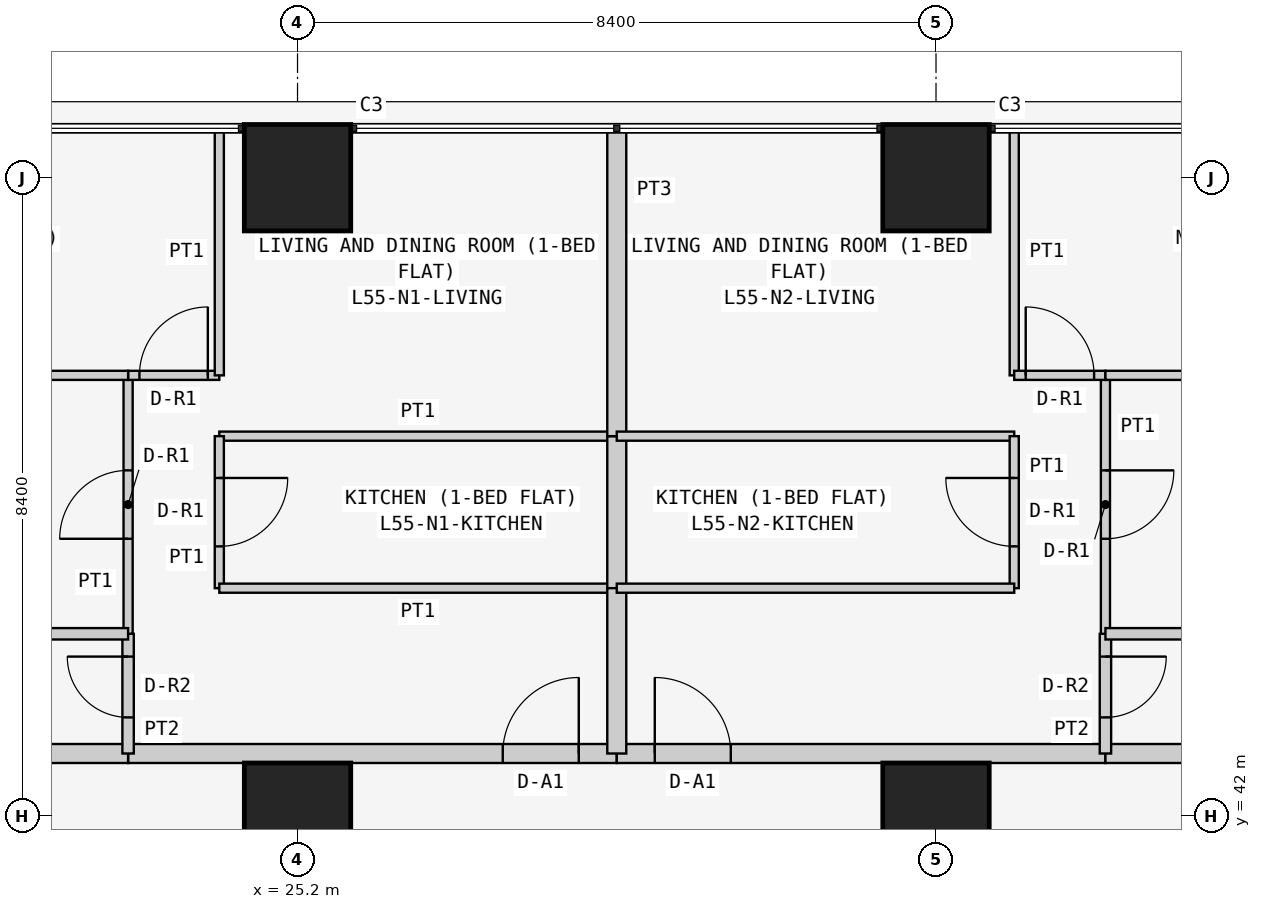
"""IFC4 building model, lengths in metres.
Left out: names, types, materials, properties, quantities, classifications, styles, units other than length and angle.
Written with IfcOpenShell. Run it as: python <this file> out.ifc"""

import sys

from ifc_helpers import new_model, si_unit, direction, frame, frame_2d, origin, origin_2d, place, context, subcontext, project, spatial, rectangle, extrude, element, fill, save


model = new_model("IFC4")
c1 = context("Model", 3, precision=1e-05, world=origin(), true_north=direction((0.0, 1.0)))
c2 = subcontext(c1, "Body", "Model", "MODEL_VIEW")
j1 = project(units=[si_unit("LENGTHUNIT", "METRE"), si_unit("PLANEANGLEUNIT", "RADIAN")], contexts=[c1])
p1 = place(None, origin())
s1 = spatial("IfcSite", under=j1, at=p1, CompositionType="ELEMENT")
p2 = place(p1, origin())
s2 = spatial("IfcBuilding", under=s1, at=p2, CompositionType="ELEMENT")
p3 = place(p2, frame((0.0, 0.0, 212.1)))
s3 = spatial("IfcBuildingStorey", under=s2, at=p3, CompositionType="ELEMENT", Elevation=212.1)
for number, where, z_axis, x_axis in (
    (1, (25.2, 42.0, 0.0), (0.0, 0.0, 1.0), (1.0, 0.0, 0.0)),
    (2, (25.2, 50.4, 0.0), (0.0, 0.0, 1.0), (1.0, 0.0, 0.0)),
    (3, (33.6, 42.0, 0.0), (0.0, 0.0, 1.0), (1.0, 0.0, 0.0)),
    (4, (33.6, 50.4, 0.0), (0.0, 0.0, 1.0), (1.0, 0.0, 0.0)),
):
    element("IfcColumn", number, at=place(p3, frame(where, z_axis=z_axis, x_axis=x_axis)), inside=s3, PredefinedType="COLUMN", context=c2, shape_type="SweptSolid", body=[
        extrude(rectangle(XDim=1.4, YDim=1.4, at=origin_2d()), origin(), (0.0, 0.0, 1.0), 3.6),
    ])
p4 = place(p3, frame((22.971, 42.825, 0.0), z_axis=(0.0, 0.0, 1.0), x_axis=(1.0, 0.0, 0.0)))
e5 = element("IfcWall", 5, at=p4, inside=s3, PredefinedType="PARTITIONING", context=c2, shape_type="SweptSolid", body=[
    extrude(rectangle(XDim=6.429, YDim=0.25, at=frame_2d((3.214, 0.0))), origin(), (0.0, 0.0, 1.0), 3.45),
])
p5 = place(p4, frame((4.929, 0.0, 0.0)))
e6 = element("IfcOpeningElement", 6, at=p5, cuts=e5, PredefinedType="OPENING", context=c2, shape_type="SweptSolid", body=[
    extrude(rectangle(XDim=1.0, YDim=2.1, at=frame_2d((0.5, 1.05))), frame((0.0, 0.135, 0.0), z_axis=(0.0, -1.0, 0.0), x_axis=(1.0, 0.0, 0.0)), (0.0, 0.0, 1.0), 0.27),
])
p6 = place(p3, frame((16.1, 42.825, 0.0), z_axis=(0.0, 0.0, 1.0), x_axis=(1.0, 0.0, 0.0)))
e7 = element("IfcWall", 7, at=p6, inside=s3, PredefinedType="PARTITIONING", context=c2, shape_type="SweptSolid", body=[
    extrude(rectangle(XDim=6.871, YDim=0.25, at=frame_2d((3.436, 0.0))), origin(), (0.0, 0.0, 1.0), 3.45),
])
p7 = place(p3, frame((29.4, 42.825, 0.0), z_axis=(0.0, 0.0, 1.0), x_axis=(1.0, 0.0, 0.0)))
e8 = element("IfcWall", 8, at=p7, inside=s3, PredefinedType="PARTITIONING", context=c2, shape_type="SweptSolid", body=[
    extrude(rectangle(XDim=6.429, YDim=0.25, at=frame_2d((3.215, 0.0))), origin(), (0.0, 0.0, 1.0), 3.45),
])
p8 = place(p7, frame((0.5, 0.0, 0.0)))
e9 = element("IfcOpeningElement", 9, at=p8, cuts=e8, PredefinedType="OPENING", context=c2, shape_type="SweptSolid", body=[
    extrude(rectangle(XDim=1.0, YDim=2.1, at=frame_2d((0.5, 1.05))), frame((0.0, 0.135, 0.0), z_axis=(0.0, -1.0, 0.0), x_axis=(1.0, 0.0, 0.0)), (0.0, 0.0, 1.0), 0.27),
])
p9 = place(p3, frame((35.829, 42.825, 0.0), z_axis=(0.0, 0.0, 1.0), x_axis=(1.0, 0.0, 0.0)))
e10 = element("IfcWall", 10, at=p9, inside=s3, PredefinedType="PARTITIONING", context=c2, shape_type="SweptSolid", body=[
    extrude(rectangle(XDim=6.871, YDim=0.25, at=frame_2d((3.436, 0.0))), origin(), (0.0, 0.0, 1.0), 3.45),
])
p10 = place(p3, frame((29.4, 47.0, 0.0), z_axis=(0.0, 0.0, 1.0), x_axis=(-1.0, 0.0, 0.0)))
e11 = element("IfcWall", 11, at=p10, inside=s3, PredefinedType="PARTITIONING", context=c2, shape_type="SweptSolid", body=[
    extrude(rectangle(XDim=5.229, YDim=0.12, at=frame_2d((2.615, 0.0))), origin(), (0.0, 0.0, 1.0), 3.45),
])
p11 = place(p3, frame((24.171, 47.0, 0.0), z_axis=(0.0, 0.0, 1.0), x_axis=(0.0, -1.0, 0.0)))
e12 = element("IfcWall", 12, at=p11, inside=s3, PredefinedType="PARTITIONING", context=c2, shape_type="SweptSolid", body=[
    extrude(rectangle(XDim=2.0, YDim=0.12, at=frame_2d((1.0, 0.0))), origin(), (0.0, 0.0, 1.0), 3.45),
])
p12 = place(p11, frame((0.55, 0.0, 0.0)))
e13 = element("IfcOpeningElement", 13, at=p12, cuts=e12, PredefinedType="OPENING", context=c2, shape_type="SweptSolid", body=[
    extrude(rectangle(XDim=0.9, YDim=2.1, at=frame_2d((0.45, 1.05))), frame((0.0, 0.07, 0.0), z_axis=(0.0, -1.0, 0.0), x_axis=(1.0, 0.0, 0.0)), (0.0, 0.0, 1.0), 0.14),
])
p13 = place(p3, frame((24.171, 45.0, 0.0), z_axis=(0.0, 0.0, 1.0), x_axis=(1.0, 0.0, 0.0)))
e14 = element("IfcWall", 14, at=p13, inside=s3, PredefinedType="PARTITIONING", context=c2, shape_type="SweptSolid", body=[
    extrude(rectangle(XDim=5.229, YDim=0.12, at=frame_2d((2.615, 0.0))), origin(), (0.0, 0.0, 1.0), 3.45),
])
p14 = place(p3, frame((29.4, 45.0, 0.0), z_axis=(0.0, 0.0, 1.0), x_axis=(0.0, 1.0, 0.0)))
e15 = element("IfcWall", 15, at=p14, inside=s3, PredefinedType="PARTITIONING", context=c2, shape_type="SweptSolid", body=[
    extrude(rectangle(XDim=2.0, YDim=0.25, at=frame_2d((1.0, 0.0))), origin(), (0.0, 0.0, 1.0), 2.848),
])
p15 = place(p3, frame((22.971, 42.825, 0.0), z_axis=(0.0, 0.0, 1.0), x_axis=(0.0, 1.0, 0.0)))
e16 = element("IfcWall", 16, at=p15, inside=s3, PredefinedType="PARTITIONING", context=c2, shape_type="SweptSolid", body=[
    extrude(rectangle(XDim=1.575, YDim=0.15, at=frame_2d((0.788, 0.0))), origin(), (0.0, 0.0, 1.0), 3.45),
])
p16 = place(p15, frame((0.475, 0.0, 0.0)))
e17 = element("IfcOpeningElement", 17, at=p16, cuts=e16, PredefinedType="OPENING", context=c2, shape_type="SweptSolid", body=[
    extrude(rectangle(XDim=0.8, YDim=2.1, at=frame_2d((0.4, 1.05))), frame((0.0, 0.085, 0.0), z_axis=(0.0, -1.0, 0.0), x_axis=(1.0, 0.0, 0.0)), (0.0, 0.0, 1.0), 0.17),
])
p17 = place(p3, frame((22.971, 44.4, 0.0), z_axis=(0.0, 0.0, 1.0), x_axis=(0.0, 1.0, 0.0)))
e18 = element("IfcWall", 18, at=p17, inside=s3, PredefinedType="PARTITIONING", context=c2, shape_type="SweptSolid", body=[
    extrude(rectangle(XDim=3.4, YDim=0.12, at=frame_2d((1.7, 0.0))), origin(), (0.0, 0.0, 1.0), 3.45),
])
p18 = place(p17, frame((1.25, 0.0, 0.0)))
e19 = element("IfcOpeningElement", 19, at=p18, cuts=e18, PredefinedType="OPENING", context=c2, shape_type="SweptSolid", body=[
    extrude(rectangle(XDim=0.9, YDim=2.1, at=frame_2d((0.45, 1.05))), frame((0.0, 0.07, 0.0), z_axis=(0.0, -1.0, 0.0), x_axis=(1.0, 0.0, 0.0)), (0.0, 0.0, 1.0), 0.14),
])
p19 = place(p3, frame((22.971, 47.8, 0.0), z_axis=(0.0, 0.0, 1.0), x_axis=(1.0, 0.0, 0.0)))
e20 = element("IfcWall", 20, at=p19, inside=s3, PredefinedType="PARTITIONING", context=c2, shape_type="SweptSolid", body=[
    extrude(rectangle(XDim=1.2, YDim=0.12, at=frame_2d((0.6, 0.0))), origin(), (0.0, 0.0, 1.0), 3.45),
])
p20 = place(p19, frame((0.149, 0.0, 0.0)))
e21 = element("IfcOpeningElement", 21, at=p20, cuts=e20, PredefinedType="OPENING", context=c2, shape_type="SweptSolid", body=[
    extrude(rectangle(XDim=0.9, YDim=2.1, at=frame_2d((0.45, 1.05))), frame((0.0, 0.07, 0.0), z_axis=(0.0, -1.0, 0.0), x_axis=(1.0, 0.0, 0.0)), (0.0, 0.0, 1.0), 0.14),
])
p21 = place(p3, frame((24.171, 47.8, 0.0), z_axis=(0.0, 0.0, 1.0), x_axis=(0.0, 1.0, 0.0)))
e22 = element("IfcWall", 22, at=p21, inside=s3, PredefinedType="PARTITIONING", context=c2, shape_type="SweptSolid", body=[
    extrude(rectangle(XDim=3.25, YDim=0.12, at=frame_2d((1.625, 0.0))), origin(), (0.0, 0.0, 1.0), 3.45),
])
p22 = place(p3, frame((29.4, 45.0, 0.0), z_axis=(0.0, 0.0, 1.0), x_axis=(0.0, -1.0, 0.0)))
e23 = element("IfcWall", 23, at=p22, inside=s3, PredefinedType="PARTITIONING", context=c2, shape_type="SweptSolid", body=[
    extrude(rectangle(XDim=2.175, YDim=0.25, at=frame_2d((1.087, 0.0))), origin(), (0.0, 0.0, 1.0), 2.848),
])
p23 = place(p3, frame((29.4, 51.05, 0.0), z_axis=(0.0, 0.0, 1.0), x_axis=(0.0, -1.0, 0.0)))
e24 = element("IfcWall", 24, at=p23, inside=s3, PredefinedType="PARTITIONING", context=c2, shape_type="SweptSolid", body=[
    extrude(rectangle(XDim=4.05, YDim=0.25, at=frame_2d((2.025, 0.0))), origin(), (0.0, 0.0, 1.0), 2.848),
])
p24 = place(p3, frame((22.971, 44.4, 0.0), z_axis=(0.0, 0.0, 1.0), x_axis=(-1.0, 0.0, 0.0)))
e25 = element("IfcWall", 25, at=p24, inside=s3, PredefinedType="PARTITIONING", context=c2, shape_type="SweptSolid", body=[
    extrude(rectangle(XDim=6.871, YDim=0.15, at=frame_2d((3.436, 0.0))), origin(), (0.0, 0.0, 1.0), 3.45),
])
p25 = place(p3, frame((22.971, 47.8, 0.0), z_axis=(0.0, 0.0, 1.0), x_axis=(-1.0, 0.0, 0.0)))
e26 = element("IfcWall", 26, at=p25, inside=s3, PredefinedType="PARTITIONING", context=c2, shape_type="SweptSolid", body=[
    extrude(rectangle(XDim=6.871, YDim=0.12, at=frame_2d((3.436, 0.0))), origin(), (0.0, 0.0, 1.0), 3.45),
])
p26 = place(p3, frame((29.4, 47.0, 0.0), z_axis=(0.0, 0.0, 1.0), x_axis=(1.0, 0.0, 0.0)))
e27 = element("IfcWall", 27, at=p26, inside=s3, PredefinedType="PARTITIONING", context=c2, shape_type="SweptSolid", body=[
    extrude(rectangle(XDim=5.229, YDim=0.12, at=frame_2d((2.615, 0.0))), origin(), (0.0, 0.0, 1.0), 3.45),
])
p27 = place(p3, frame((34.629, 47.0, 0.0), z_axis=(0.0, 0.0, 1.0), x_axis=(0.0, -1.0, 0.0)))
e28 = element("IfcWall", 28, at=p27, inside=s3, PredefinedType="PARTITIONING", context=c2, shape_type="SweptSolid", body=[
    extrude(rectangle(XDim=2.0, YDim=0.12, at=frame_2d((1.0, 0.0))), origin(), (0.0, 0.0, 1.0), 3.45),
])
p28 = place(p27, frame((0.55, 0.0, 0.0)))
e29 = element("IfcOpeningElement", 29, at=p28, cuts=e28, PredefinedType="OPENING", context=c2, shape_type="SweptSolid", body=[
    extrude(rectangle(XDim=0.9, YDim=2.1, at=frame_2d((0.45, 1.05))), frame((0.0, 0.07, 0.0), z_axis=(0.0, -1.0, 0.0), x_axis=(1.0, 0.0, 0.0)), (0.0, 0.0, 1.0), 0.14),
])
p29 = place(p3, frame((34.629, 45.0, 0.0), z_axis=(0.0, 0.0, 1.0), x_axis=(-1.0, 0.0, 0.0)))
e30 = element("IfcWall", 30, at=p29, inside=s3, PredefinedType="PARTITIONING", context=c2, shape_type="SweptSolid", body=[
    extrude(rectangle(XDim=5.229, YDim=0.12, at=frame_2d((2.615, 0.0))), origin(), (0.0, 0.0, 1.0), 3.45),
])
p30 = place(p3, frame((35.829, 44.4, 0.0), z_axis=(0.0, 0.0, 1.0), x_axis=(0.0, -1.0, 0.0)))
e31 = element("IfcWall", 31, at=p30, inside=s3, PredefinedType="PARTITIONING", context=c2, shape_type="SweptSolid", body=[
    extrude(rectangle(XDim=1.575, YDim=0.15, at=frame_2d((0.788, 0.0))), origin(), (0.0, 0.0, 1.0), 3.45),
])
p31 = place(p30, frame((0.3, 0.0, 0.0)))
e32 = element("IfcOpeningElement", 32, at=p31, cuts=e31, PredefinedType="OPENING", context=c2, shape_type="SweptSolid", body=[
    extrude(rectangle(XDim=0.8, YDim=2.1, at=frame_2d((0.4, 1.05))), frame((0.0, 0.085, 0.0), z_axis=(0.0, -1.0, 0.0), x_axis=(1.0, 0.0, 0.0)), (0.0, 0.0, 1.0), 0.17),
])
p32 = place(p3, frame((35.829, 47.8, 0.0), z_axis=(0.0, 0.0, 1.0), x_axis=(0.0, -1.0, 0.0)))
e33 = element("IfcWall", 33, at=p32, inside=s3, PredefinedType="PARTITIONING", context=c2, shape_type="SweptSolid", body=[
    extrude(rectangle(XDim=3.4, YDim=0.12, at=frame_2d((1.7, 0.0))), origin(), (0.0, 0.0, 1.0), 3.45),
])
p33 = place(p32, frame((1.25, 0.0, 0.0)))
e34 = element("IfcOpeningElement", 34, at=p33, cuts=e33, PredefinedType="OPENING", context=c2, shape_type="SweptSolid", body=[
    extrude(rectangle(XDim=0.9, YDim=2.1, at=frame_2d((0.45, 1.05))), frame((0.0, 0.07, 0.0), z_axis=(0.0, -1.0, 0.0), x_axis=(1.0, 0.0, 0.0)), (0.0, 0.0, 1.0), 0.14),
])
p34 = place(p3, frame((34.629, 51.05, 0.0), z_axis=(0.0, 0.0, 1.0), x_axis=(0.0, -1.0, 0.0)))
e35 = element("IfcWall", 35, at=p34, inside=s3, PredefinedType="PARTITIONING", context=c2, shape_type="SweptSolid", body=[
    extrude(rectangle(XDim=3.25, YDim=0.12, at=frame_2d((1.625, 0.0))), origin(), (0.0, 0.0, 1.0), 3.45),
])
p35 = place(p3, frame((34.629, 47.8, 0.0), z_axis=(0.0, 0.0, 1.0), x_axis=(1.0, 0.0, 0.0)))
e36 = element("IfcWall", 36, at=p35, inside=s3, PredefinedType="PARTITIONING", context=c2, shape_type="SweptSolid", body=[
    extrude(rectangle(XDim=1.2, YDim=0.12, at=frame_2d((0.6, 0.0))), origin(), (0.0, 0.0, 1.0), 3.45),
])
p36 = place(p35, frame((0.151, 0.0, 0.0)))
e37 = element("IfcOpeningElement", 37, at=p36, cuts=e36, PredefinedType="OPENING", context=c2, shape_type="SweptSolid", body=[
    extrude(rectangle(XDim=0.9, YDim=2.1, at=frame_2d((0.45, 1.05))), frame((0.0, 0.07, 0.0), z_axis=(0.0, -1.0, 0.0), x_axis=(1.0, 0.0, 0.0)), (0.0, 0.0, 1.0), 0.14),
])
p37 = place(p3, frame((35.829, 44.4, 0.0), z_axis=(0.0, 0.0, 1.0), x_axis=(1.0, 0.0, 0.0)))
e38 = element("IfcWall", 38, at=p37, inside=s3, PredefinedType="PARTITIONING", context=c2, shape_type="SweptSolid", body=[
    extrude(rectangle(XDim=6.871, YDim=0.15, at=frame_2d((3.436, 0.0))), origin(), (0.0, 0.0, 1.0), 3.45),
])
p38 = place(p3, frame((35.829, 47.8, 0.0), z_axis=(0.0, 0.0, 1.0), x_axis=(1.0, 0.0, 0.0)))
e39 = element("IfcWall", 39, at=p38, inside=s3, PredefinedType="PARTITIONING", context=c2, shape_type="SweptSolid", body=[
    extrude(rectangle(XDim=6.871, YDim=0.12, at=frame_2d((3.436, 0.0))), origin(), (0.0, 0.0, 1.0), 3.45),
])
p39 = place(p5, origin())
e40 = element("IfcDoor", 40, at=p39, inside=s3, OperationType="SINGLE_SWING_RIGHT", PredefinedType="DOOR", context=c2, shape_type="SweptSolid", body=[
    extrude(rectangle(XDim=1.0, YDim=2.1, at=frame_2d((0.5, 1.05))), frame((0.0, 0.025, 0.0), z_axis=(0.0, -1.0, 0.0), x_axis=(1.0, 0.0, 0.0)), (0.0, 0.0, 1.0), 0.05),
])
fill(e6, e40)
p40 = place(p12, origin())
e41 = element("IfcDoor", 41, at=p40, inside=s3, OperationType="SINGLE_SWING_LEFT", PredefinedType="DOOR", context=c2, shape_type="SweptSolid", body=[
    extrude(rectangle(XDim=0.9, YDim=2.1, at=frame_2d((0.45, 1.05))), frame((0.0, 0.025, 0.0), z_axis=(0.0, -1.0, 0.0), x_axis=(1.0, 0.0, 0.0)), (0.0, 0.0, 1.0), 0.05),
])
fill(e13, e41)
p41 = place(p16, origin())
e42 = element("IfcDoor", 42, at=p41, inside=s3, OperationType="SINGLE_SWING_RIGHT", PredefinedType="DOOR", context=c2, shape_type="SweptSolid", body=[
    extrude(rectangle(XDim=0.8, YDim=2.1, at=frame_2d((0.4, 1.05))), frame((0.0, 0.025, 0.0), z_axis=(0.0, -1.0, 0.0), x_axis=(1.0, 0.0, 0.0)), (0.0, 0.0, 1.0), 0.05),
])
fill(e17, e42)
p42 = place(p18, origin())
e43 = element("IfcDoor", 43, at=p42, inside=s3, OperationType="SINGLE_SWING_LEFT", PredefinedType="DOOR", context=c2, shape_type="SweptSolid", body=[
    extrude(rectangle(XDim=0.9, YDim=2.1, at=frame_2d((0.45, 1.05))), frame((0.0, 0.025, 0.0), z_axis=(0.0, -1.0, 0.0), x_axis=(1.0, 0.0, 0.0)), (0.0, 0.0, 1.0), 0.05),
])
fill(e19, e43)
p43 = place(p20, origin())
e44 = element("IfcDoor", 44, at=p43, inside=s3, OperationType="SINGLE_SWING_RIGHT", PredefinedType="DOOR", context=c2, shape_type="SweptSolid", body=[
    extrude(rectangle(XDim=0.9, YDim=2.1, at=frame_2d((0.45, 1.05))), frame((0.0, 0.025, 0.0), z_axis=(0.0, -1.0, 0.0), x_axis=(1.0, 0.0, 0.0)), (0.0, 0.0, 1.0), 0.05),
])
fill(e21, e44)
p44 = place(p8, origin())
e45 = element("IfcDoor", 45, at=p44, inside=s3, OperationType="SINGLE_SWING_LEFT", PredefinedType="DOOR", context=c2, shape_type="SweptSolid", body=[
    extrude(rectangle(XDim=1.0, YDim=2.1, at=frame_2d((0.5, 1.05))), frame((0.0, 0.025, 0.0), z_axis=(0.0, -1.0, 0.0), x_axis=(1.0, 0.0, 0.0)), (0.0, 0.0, 1.0), 0.05),
])
fill(e9, e45)
p45 = place(p28, frame((0.9, 0.0, 0.0), z_axis=(0.0, 0.0, 1.0), x_axis=(-1.0, 0.0, 0.0)))
e46 = element("IfcDoor", 46, at=p45, inside=s3, OperationType="SINGLE_SWING_RIGHT", PredefinedType="DOOR", context=c2, shape_type="SweptSolid", body=[
    extrude(rectangle(XDim=0.9, YDim=2.1, at=frame_2d((0.45, 1.05))), frame((0.0, 0.025, 0.0), z_axis=(0.0, -1.0, 0.0), x_axis=(1.0, 0.0, 0.0)), (0.0, 0.0, 1.0), 0.05),
])
fill(e29, e46)
p46 = place(p31, origin())
e47 = element("IfcDoor", 47, at=p46, inside=s3, OperationType="SINGLE_SWING_LEFT", PredefinedType="DOOR", context=c2, shape_type="SweptSolid", body=[
    extrude(rectangle(XDim=0.8, YDim=2.1, at=frame_2d((0.4, 1.05))), frame((0.0, 0.025, 0.0), z_axis=(0.0, -1.0, 0.0), x_axis=(1.0, 0.0, 0.0)), (0.0, 0.0, 1.0), 0.05),
])
fill(e32, e47)
p47 = place(p33, origin())
e48 = element("IfcDoor", 48, at=p47, inside=s3, OperationType="SINGLE_SWING_LEFT", PredefinedType="DOOR", context=c2, shape_type="SweptSolid", body=[
    extrude(rectangle(XDim=0.9, YDim=2.1, at=frame_2d((0.45, 1.05))), frame((0.0, 0.025, 0.0), z_axis=(0.0, -1.0, 0.0), x_axis=(1.0, 0.0, 0.0)), (0.0, 0.0, 1.0), 0.05),
])
fill(e34, e48)
p48 = place(p36, origin())
e49 = element("IfcDoor", 49, at=p48, inside=s3, OperationType="SINGLE_SWING_LEFT", PredefinedType="DOOR", context=c2, shape_type="SweptSolid", body=[
    extrude(rectangle(XDim=0.9, YDim=2.1, at=frame_2d((0.45, 1.05))), frame((0.0, 0.025, 0.0), z_axis=(0.0, -1.0, 0.0), x_axis=(1.0, 0.0, 0.0)), (0.0, 0.0, 1.0), 0.05),
])
fill(e37, e49)
save(model, sys.argv[1])
